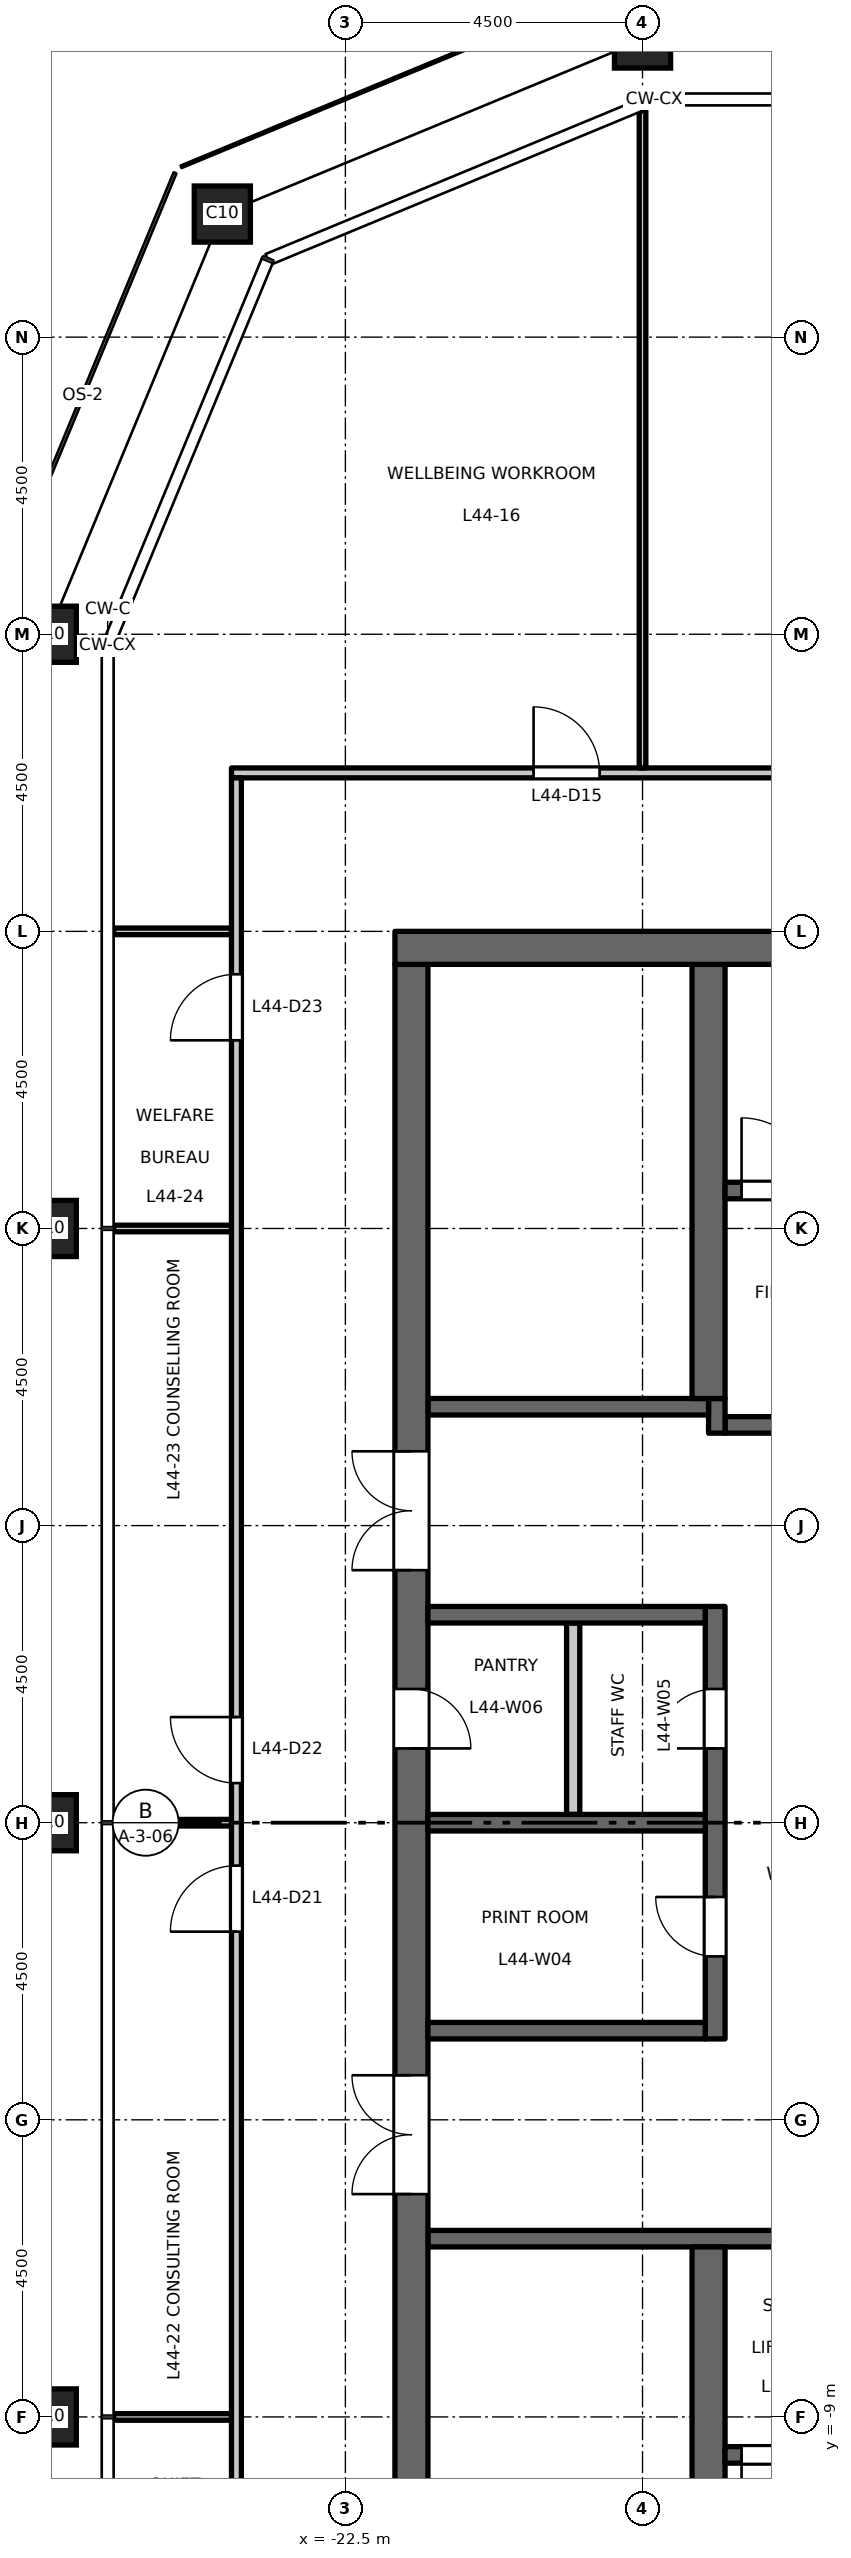
"""IFC4 building model, lengths in metres.
Left out: names, types, materials, properties, quantities, classifications, styles, units other than length and angle.
Written with IfcOpenShell. Run it as: python <this file> out.ifc"""

import sys

from ifc_helpers import new_model, si_unit, direction, frame, frame_2d, origin, origin_2d, place, context, subcontext, project, spatial, rectangle, hollow_rectangle, extrude, element, fill, save


model = new_model("IFC4")
c1 = context("Model", 3, precision=1e-05, world=origin(), true_north=direction((0.0, 1.0)))
c2 = subcontext(c1, "Body", "Model", "MODEL_VIEW")
j1 = project(units=[si_unit("LENGTHUNIT", "METRE"), si_unit("PLANEANGLEUNIT", "RADIAN")], contexts=[c1])
p1 = place(None, origin())
s1 = spatial("IfcSite", under=j1, at=p1, CompositionType="ELEMENT")
p2 = place(p1, origin())
s2 = spatial("IfcBuilding", under=s1, at=p2, CompositionType="ELEMENT")
p3 = place(p2, frame((0.0, 0.0, 206.2)))
s3 = spatial("IfcBuildingStorey", under=s2, at=p3, CompositionType="ELEMENT", Elevation=206.2)
for number, where, z_axis, x_axis in (
    (1, (-18.0, 27.0, 0.0), (0.0, 0.0, 1.0), (1.0, 0.0, 0.0)),
    (2, (-24.364, 24.364, 0.0), (0.0, 0.0, 1.0), (1.0, 0.0, 0.0)),
    (3, (-27.0, 18.0, 0.0), (0.0, 0.0, 1.0), (1.0, 0.0, 0.0)),
    (4, (-27.0, 9.0, 0.0), (0.0, 0.0, 1.0), (1.0, 0.0, 0.0)),
    (5, (-27.0, 0.0, 0.0), (0.0, 0.0, 1.0), (1.0, 0.0, 0.0)),
    (6, (-27.0, -9.0, 0.0), (0.0, 0.0, 1.0), (1.0, 0.0, 0.0)),
):
    element("IfcColumn", number, at=place(p3, frame(where, z_axis=z_axis, x_axis=x_axis)), inside=s3, PredefinedType="COLUMN", context=c2, shape_type="SweptSolid", body=[
        extrude(hollow_rectangle(XDim=0.85, YDim=0.85, WallThickness=0.05, at=origin_2d()), origin(), (0.0, 0.0, 1.0), 4.5),
    ])
p4 = place(p3, frame((-12.15, 6.025, 0.0), z_axis=(0.0, 0.0, 1.0), x_axis=(-1.0, 0.0, 0.0)))
e7 = element("IfcWall", 7, at=p4, inside=s3, PredefinedType="SHEAR", context=c2, shape_type="SweptSolid", body=[
    extrude(rectangle(XDim=4.6, YDim=0.25, at=frame_2d((2.3, 0.0))), origin(), (0.0, 0.0, 1.0), 4.35),
])
p5 = place(p4, frame((1.8, 0.0, 0.0)))
e8 = element("IfcOpeningElement", 8, at=p5, cuts=e7, PredefinedType="OPENING", context=c2, shape_type="SweptSolid", body=[
    extrude(rectangle(XDim=1.0, YDim=2.1, at=frame_2d((0.5, 1.05))), frame((0.0, 0.135, 0.0), z_axis=(0.0, -1.0, 0.0), x_axis=(1.0, 0.0, 0.0)), (0.0, 0.0, 1.0), 0.27),
])
p6 = place(p3, frame((-16.875, 5.9, 0.0), z_axis=(0.0, 0.0, 1.0), x_axis=(0.0, 1.0, 0.0)))
e9 = element("IfcWall", 9, at=p6, inside=s3, PredefinedType="SHEAR", context=c2, shape_type="SweptSolid", body=[
    extrude(rectangle(XDim=0.525, YDim=0.25, at=frame_2d((0.263, 0.0))), origin(), (0.0, 0.0, 1.0), 4.35),
])
p7 = place(p3, frame((-17.0, 6.3, 0.0), z_axis=(0.0, 0.0, 1.0), x_axis=(-1.0, 0.0, 0.0)))
e10 = element("IfcWall", 10, at=p7, inside=s3, PredefinedType="SHEAR", context=c2, shape_type="SweptSolid", body=[
    extrude(rectangle(XDim=4.25, YDim=0.25, at=frame_2d((2.125, 0.0))), origin(), (0.0, 0.0, 1.0), 4.35),
])
p8 = place(p3, frame((-12.15, -6.3, 0.0), z_axis=(0.0, 0.0, 1.0), x_axis=(-1.0, 0.0, 0.0)))
e11 = element("IfcWall", 11, at=p8, inside=s3, PredefinedType="SHEAR", context=c2, shape_type="SweptSolid", body=[
    extrude(rectangle(XDim=9.1, YDim=0.25, at=frame_2d((4.55, 0.0))), origin(), (0.0, 0.0, 1.0), 4.35),
])
p9 = place(p8, frame((1.8, 0.0, 0.0)))
e12 = element("IfcOpeningElement", 12, at=p9, cuts=e11, PredefinedType="OPENING", context=c2, shape_type="SweptSolid", body=[
    extrude(rectangle(XDim=1.0, YDim=2.1, at=frame_2d((0.5, 1.05))), frame((0.0, 0.135, 0.0), z_axis=(0.0, -1.0, 0.0), x_axis=(1.0, 0.0, 0.0)), (0.0, 0.0, 1.0), 0.27),
])
p10 = place(p3, frame((-21.5, -13.0, 0.0), z_axis=(0.0, 0.0, 1.0), x_axis=(0.0, 1.0, 0.0)))
e13 = element("IfcWall", 13, at=p10, inside=s3, PredefinedType="SHEAR", context=c2, shape_type="SweptSolid", body=[
    extrude(rectangle(XDim=26.0, YDim=0.5, at=frame_2d((13.0, 0.0))), origin(), (0.0, 0.0, 1.0), 4.35),
])
p11 = place(p10, frame((16.825, 0.0, 0.0)))
e14 = element("IfcOpeningElement", 14, at=p11, cuts=e13, PredefinedType="OPENING", context=c2, shape_type="SweptSolid", body=[
    extrude(rectangle(XDim=1.8, YDim=2.1, at=frame_2d((0.9, 1.05))), frame((0.0, 0.26, 0.0), z_axis=(0.0, -1.0, 0.0), x_axis=(1.0, 0.0, 0.0)), (0.0, 0.0, 1.0), 0.52),
])
p12 = place(p10, frame((7.375, 0.0, 0.0)))
e15 = element("IfcOpeningElement", 15, at=p12, cuts=e13, PredefinedType="OPENING", context=c2, shape_type="SweptSolid", body=[
    extrude(rectangle(XDim=1.8, YDim=2.1, at=frame_2d((0.9, 1.05))), frame((0.0, 0.26, 0.0), z_axis=(0.0, -1.0, 0.0), x_axis=(1.0, 0.0, 0.0)), (0.0, 0.0, 1.0), 0.52),
])
p13 = place(p10, frame((14.125, 0.0, 0.0)))
e16 = element("IfcOpeningElement", 16, at=p13, cuts=e13, PredefinedType="OPENING", context=c2, shape_type="SweptSolid", body=[
    extrude(rectangle(XDim=0.9, YDim=2.1, at=frame_2d((0.45, 1.05))), frame((0.0, 0.26, 0.0), z_axis=(0.0, -1.0, 0.0), x_axis=(1.0, 0.0, 0.0)), (0.0, 0.0, 1.0), 0.52),
])
p14 = place(p3, frame((-16.9, -3.275, 0.0), z_axis=(0.0, 0.0, 1.0), x_axis=(0.0, 1.0, 0.0)))
e17 = element("IfcWall", 17, at=p14, inside=s3, PredefinedType="SHEAR", context=c2, shape_type="SweptSolid", body=[
    extrude(rectangle(XDim=6.55, YDim=0.3, at=frame_2d((3.275, 0.0))), origin(), (0.0, 0.0, 1.0), 4.35),
])
p15 = place(p14, frame((1.25, 0.0, 0.0)))
e18 = element("IfcOpeningElement", 18, at=p15, cuts=e17, PredefinedType="OPENING", context=c2, shape_type="SweptSolid", body=[
    extrude(rectangle(XDim=0.9, YDim=2.1, at=frame_2d((0.45, 1.05))), frame((0.0, 0.16, 0.0), z_axis=(0.0, -1.0, 0.0), x_axis=(1.0, 0.0, 0.0)), (0.0, 0.0, 1.0), 0.32),
])
p16 = place(p14, frame((4.4, 0.0, 0.0)))
e19 = element("IfcOpeningElement", 19, at=p16, cuts=e17, PredefinedType="OPENING", context=c2, shape_type="SweptSolid", body=[
    extrude(rectangle(XDim=0.9, YDim=2.1, at=frame_2d((0.45, 1.05))), frame((0.0, 0.16, 0.0), z_axis=(0.0, -1.0, 0.0), x_axis=(1.0, 0.0, 0.0)), (0.0, 0.0, 1.0), 0.32),
])
for number, where, z_axis, x_axis in (
    (20, (-17.05, 0.0, 0.0), (0.0, 0.0, 1.0), (-1.0, 0.0, 0.0)),
    (21, (-17.05, 3.15, 0.0), (0.0, 0.0, 1.0), (-1.0, 0.0, 0.0)),
    (22, (-17.05, -3.15, 0.0), (0.0, 0.0, 1.0), (-1.0, 0.0, 0.0)),
):
    element("IfcWall", number, at=place(p3, frame(where, z_axis=z_axis, x_axis=x_axis)), inside=s3, PredefinedType="SHEAR", context=c2, shape_type="SweptSolid", body=[
        extrude(rectangle(XDim=4.2, YDim=0.25, at=frame_2d((2.1, 0.0))), origin(), (0.0, 0.0, 1.0), 4.35),
    ])
p17 = place(p3, frame((-19.05, 0.125, 0.0), z_axis=(0.0, 0.0, 1.0), x_axis=(0.0, 1.0, 0.0)))
e23 = element("IfcWall", 23, at=p17, inside=s3, PredefinedType="PARTITIONING", context=c2, shape_type="SweptSolid", body=[
    extrude(rectangle(XDim=2.9, YDim=0.2, at=frame_2d((1.45, 0.0))), origin(), (0.0, 0.0, 1.0), 4.35),
])
for number, where, z_axis, x_axis in (
    (24, (-17.0, 6.425, 0.0), (0.0, 0.0, 1.0), (0.0, 1.0, 0.0)),
    (25, (-17.0, -13.0, 0.0), (0.0, 0.0, 1.0), (0.0, 1.0, 0.0)),
):
    element("IfcWall", number, at=place(p3, frame(where, z_axis=z_axis, x_axis=x_axis)), inside=s3, PredefinedType="SHEAR", context=c2, shape_type="SweptSolid", body=[
        extrude(rectangle(XDim=6.575, YDim=0.5, at=frame_2d((3.288, 0.0))), origin(), (0.0, 0.0, 1.0), 4.35),
    ])
p18 = place(p3, frame((-8.75, 9.575, 0.0), z_axis=(0.0, 0.0, 1.0), x_axis=(-1.0, 0.0, 0.0)))
e26 = element("IfcWall", 26, at=p18, inside=s3, PredefinedType="SHEAR", context=c2, shape_type="SweptSolid", body=[
    extrude(rectangle(XDim=8.0, YDim=0.25, at=frame_2d((4.0, 0.0))), origin(), (0.0, 0.0, 1.0), 4.35),
])
p19 = place(p18, frame((6.65, 0.0, 0.0)))
e27 = element("IfcOpeningElement", 27, at=p19, cuts=e26, PredefinedType="OPENING", context=c2, shape_type="SweptSolid", body=[
    extrude(rectangle(XDim=1.1, YDim=2.1, at=frame_2d((0.55, 1.05))), frame((0.0, 0.135, 0.0), z_axis=(0.0, -1.0, 0.0), x_axis=(1.0, 0.0, 0.0)), (0.0, 0.0, 1.0), 0.27),
])
p20 = place(p3, frame((-8.75, -9.575, 0.0), z_axis=(0.0, 0.0, 1.0), x_axis=(-1.0, 0.0, 0.0)))
e28 = element("IfcWall", 28, at=p20, inside=s3, PredefinedType="SHEAR", context=c2, shape_type="SweptSolid", body=[
    extrude(rectangle(XDim=8.0, YDim=0.25, at=frame_2d((4.0, 0.0))), origin(), (0.0, 0.0, 1.0), 4.35),
])
p21 = place(p20, frame((6.65, 0.0, 0.0)))
e29 = element("IfcOpeningElement", 29, at=p21, cuts=e28, PredefinedType="OPENING", context=c2, shape_type="SweptSolid", body=[
    extrude(rectangle(XDim=1.1, YDim=2.1, at=frame_2d((0.55, 1.05))), frame((0.0, 0.135, 0.0), z_axis=(0.0, -1.0, 0.0), x_axis=(1.0, 0.0, 0.0)), (0.0, 0.0, 1.0), 0.27),
])
p22 = place(p3, frame((-8.25, 13.25, 0.0), z_axis=(0.0, 0.0, 1.0), x_axis=(-1.0, 0.0, 0.0)))
e30 = element("IfcWall", 30, at=p22, inside=s3, PredefinedType="SHEAR", context=c2, shape_type="SweptSolid", body=[
    extrude(rectangle(XDim=13.5, YDim=0.5, at=frame_2d((6.75, 0.0))), origin(), (0.0, 0.0, 1.0), 4.35),
])
for number, where, z_axis, x_axis in (
    (31, (-26.01, -9.0, 0.0), (0.0, 0.0, 1.0), (1.0, 0.0, 0.0)),
    (32, (-26.01, 0.0, 0.0), (0.0, 0.0, 1.0), (1.0, 0.0, 0.0)),
    (33, (-26.01, 9.0, 0.0), (0.0, 0.0, 1.0), (1.0, 0.0, 0.0)),
    (34, (-26.01, 13.5, 0.0), (0.0, 0.0, 1.0), (1.0, 0.0, 0.0)),
):
    element("IfcWall", number, at=place(p3, frame(where, z_axis=z_axis, x_axis=x_axis)), inside=s3, PredefinedType="PARTITIONING", context=c2, shape_type="SweptSolid", body=[
        extrude(rectangle(XDim=1.785, YDim=0.1, at=frame_2d((0.893, 0.0))), origin(), (0.0, 0.0, 1.0), 4.35),
    ])
p23 = place(p3, frame((-24.225, 15.9, 0.0), z_axis=(0.0, 0.0, 1.0), x_axis=(1.0, 0.0, 0.0)))
e35 = element("IfcWall", 35, at=p23, inside=s3, PredefinedType="PARTITIONING", context=c2, shape_type="SweptSolid", body=[
    extrude(rectangle(XDim=48.45, YDim=0.15, at=frame_2d((24.225, 0.0))), origin(), (0.0, 0.0, 1.0), 4.35),
])
p24 = place(p23, frame((13.575, 0.0, 0.0)))
e36 = element("IfcOpeningElement", 36, at=p24, cuts=e35, PredefinedType="OPENING", context=c2, shape_type="SweptSolid", body=[
    extrude(rectangle(XDim=1.0, YDim=2.1, at=frame_2d((0.5, 1.05))), frame((0.0, 0.085, 0.0), z_axis=(0.0, -1.0, 0.0), x_axis=(1.0, 0.0, 0.0)), (0.0, 0.0, 1.0), 0.17),
])
p25 = place(p23, frame((15.825, 0.0, 0.0)))
e37 = element("IfcOpeningElement", 37, at=p25, cuts=e35, PredefinedType="OPENING", context=c2, shape_type="SweptSolid", body=[
    extrude(rectangle(XDim=1.0, YDim=2.1, at=frame_2d((0.5, 1.05))), frame((0.0, 0.085, 0.0), z_axis=(0.0, -1.0, 0.0), x_axis=(1.0, 0.0, 0.0)), (0.0, 0.0, 1.0), 0.17),
])
p26 = place(p23, frame((31.575, 0.0, 0.0)))
e38 = element("IfcOpeningElement", 38, at=p26, cuts=e35, PredefinedType="OPENING", context=c2, shape_type="SweptSolid", body=[
    extrude(rectangle(XDim=1.0, YDim=2.1, at=frame_2d((0.5, 1.05))), frame((0.0, 0.085, 0.0), z_axis=(0.0, -1.0, 0.0), x_axis=(1.0, 0.0, 0.0)), (0.0, 0.0, 1.0), 0.17),
])
p27 = place(p23, frame((40.575, 0.0, 0.0)))
e39 = element("IfcOpeningElement", 39, at=p27, cuts=e35, PredefinedType="OPENING", context=c2, shape_type="SweptSolid", body=[
    extrude(rectangle(XDim=1.0, YDim=2.1, at=frame_2d((0.5, 1.05))), frame((0.0, 0.085, 0.0), z_axis=(0.0, -1.0, 0.0), x_axis=(1.0, 0.0, 0.0)), (0.0, 0.0, 1.0), 0.17),
])
p28 = place(p23, frame((4.575, 0.0, 0.0)))
e40 = element("IfcOpeningElement", 40, at=p28, cuts=e35, PredefinedType="OPENING", context=c2, shape_type="SweptSolid", body=[
    extrude(rectangle(XDim=1.0, YDim=2.1, at=frame_2d((0.5, 1.05))), frame((0.0, 0.085, 0.0), z_axis=(0.0, -1.0, 0.0), x_axis=(1.0, 0.0, 0.0)), (0.0, 0.0, 1.0), 0.17),
])
p29 = place(p23, frame((42.725, 0.0, 0.0)))
e41 = element("IfcOpeningElement", 41, at=p29, cuts=e35, PredefinedType="OPENING", context=c2, shape_type="SweptSolid", body=[
    extrude(rectangle(XDim=1.0, YDim=2.1, at=frame_2d((0.5, 1.05))), frame((0.0, 0.085, 0.0), z_axis=(0.0, -1.0, 0.0), x_axis=(1.0, 0.0, 0.0)), (0.0, 0.0, 1.0), 0.17),
])
p30 = place(p3, frame((-24.15, -15.825, 0.0), z_axis=(0.0, 0.0, 1.0), x_axis=(0.0, 1.0, 0.0)))
e42 = element("IfcWall", 42, at=p30, inside=s3, PredefinedType="PARTITIONING", context=c2, shape_type="SweptSolid", body=[
    extrude(rectangle(XDim=31.65, YDim=0.15, at=frame_2d((15.825, 0.0))), origin(), (0.0, 0.0, 1.0), 4.35),
])
p31 = place(p30, frame((0.675, 0.0, 0.0)))
e43 = element("IfcOpeningElement", 43, at=p31, cuts=e42, PredefinedType="OPENING", context=c2, shape_type="SweptSolid", body=[
    extrude(rectangle(XDim=1.0, YDim=2.1, at=frame_2d((0.5, 1.05))), frame((0.0, 0.085, 0.0), z_axis=(0.0, -1.0, 0.0), x_axis=(1.0, 0.0, 0.0)), (0.0, 0.0, 1.0), 0.17),
])
p32 = place(p30, frame((2.925, 0.0, 0.0)))
e44 = element("IfcOpeningElement", 44, at=p32, cuts=e42, PredefinedType="OPENING", context=c2, shape_type="SweptSolid", body=[
    extrude(rectangle(XDim=1.0, YDim=2.1, at=frame_2d((0.5, 1.05))), frame((0.0, 0.085, 0.0), z_axis=(0.0, -1.0, 0.0), x_axis=(1.0, 0.0, 0.0)), (0.0, 0.0, 1.0), 0.17),
])
p33 = place(p30, frame((14.175, 0.0, 0.0)))
e45 = element("IfcOpeningElement", 45, at=p33, cuts=e42, PredefinedType="OPENING", context=c2, shape_type="SweptSolid", body=[
    extrude(rectangle(XDim=1.0, YDim=2.1, at=frame_2d((0.5, 1.05))), frame((0.0, 0.085, 0.0), z_axis=(0.0, -1.0, 0.0), x_axis=(1.0, 0.0, 0.0)), (0.0, 0.0, 1.0), 0.17),
])
p34 = place(p30, frame((16.425, 0.0, 0.0)))
e46 = element("IfcOpeningElement", 46, at=p34, cuts=e42, PredefinedType="OPENING", context=c2, shape_type="SweptSolid", body=[
    extrude(rectangle(XDim=1.0, YDim=2.1, at=frame_2d((0.5, 1.05))), frame((0.0, 0.085, 0.0), z_axis=(0.0, -1.0, 0.0), x_axis=(1.0, 0.0, 0.0)), (0.0, 0.0, 1.0), 0.17),
])
p35 = place(p30, frame((27.675, 0.0, 0.0)))
e47 = element("IfcOpeningElement", 47, at=p35, cuts=e42, PredefinedType="OPENING", context=c2, shape_type="SweptSolid", body=[
    extrude(rectangle(XDim=1.0, YDim=2.1, at=frame_2d((0.5, 1.05))), frame((0.0, 0.085, 0.0), z_axis=(0.0, -1.0, 0.0), x_axis=(1.0, 0.0, 0.0)), (0.0, 0.0, 1.0), 0.17),
])
p36 = place(p3, frame((-18.0, 15.975, 0.0), z_axis=(0.0, 0.0, 1.0), x_axis=(0.0, 1.0, 0.0)))
e48 = element("IfcWall", 48, at=p36, inside=s3, PredefinedType="PARTITIONING", context=c2, shape_type="SweptSolid", body=[
    extrude(rectangle(XDim=9.953, YDim=0.1, at=frame_2d((4.977, 0.0))), origin(), (0.0, 0.0, 1.0), 3.65),
])
p37 = place(p19, origin())
e49 = element("IfcDoor", 49, at=p37, inside=s3, OperationType="SINGLE_SWING_RIGHT", PredefinedType="DOOR", context=c2, shape_type="SweptSolid", body=[
    extrude(rectangle(XDim=1.1, YDim=2.1, at=frame_2d((0.55, 1.05))), frame((0.0, 0.025, 0.0), z_axis=(0.0, -1.0, 0.0), x_axis=(1.0, 0.0, 0.0)), (0.0, 0.0, 1.0), 0.05),
])
fill(e27, e49)
p38 = place(p21, origin())
e50 = element("IfcDoor", 50, at=p38, inside=s3, OperationType="SINGLE_SWING_LEFT", PredefinedType="DOOR", context=c2, shape_type="SweptSolid", body=[
    extrude(rectangle(XDim=1.1, YDim=2.1, at=frame_2d((0.55, 1.05))), frame((0.0, 0.025, 0.0), z_axis=(0.0, -1.0, 0.0), x_axis=(1.0, 0.0, 0.0)), (0.0, 0.0, 1.0), 0.05),
])
fill(e29, e50)
p39 = place(p11, origin())
e51 = element("IfcDoor", 51, at=p39, inside=s3, OperationType="DOUBLE_DOOR_DOUBLE_SWING", PredefinedType="DOOR", context=c2, shape_type="SweptSolid", body=[
    extrude(rectangle(XDim=1.8, YDim=2.1, at=frame_2d((0.9, 1.05))), frame((0.0, 0.025, 0.0), z_axis=(0.0, -1.0, 0.0), x_axis=(1.0, 0.0, 0.0)), (0.0, 0.0, 1.0), 0.05),
])
fill(e14, e51)
p40 = place(p12, origin())
e52 = element("IfcDoor", 52, at=p40, inside=s3, OperationType="DOUBLE_DOOR_DOUBLE_SWING", PredefinedType="DOOR", context=c2, shape_type="SweptSolid", body=[
    extrude(rectangle(XDim=1.8, YDim=2.1, at=frame_2d((0.9, 1.05))), frame((0.0, 0.025, 0.0), z_axis=(0.0, -1.0, 0.0), x_axis=(1.0, 0.0, 0.0)), (0.0, 0.0, 1.0), 0.05),
])
fill(e15, e52)
p41 = place(p15, origin())
e53 = element("IfcDoor", 53, at=p41, inside=s3, OperationType="SINGLE_SWING_LEFT", PredefinedType="DOOR", context=c2, shape_type="SweptSolid", body=[
    extrude(rectangle(XDim=0.9, YDim=2.1, at=frame_2d((0.45, 1.05))), frame((0.0, 0.025, 0.0), z_axis=(0.0, -1.0, 0.0), x_axis=(1.0, 0.0, 0.0)), (0.0, 0.0, 1.0), 0.05),
])
fill(e18, e53)
p42 = place(p16, origin())
e54 = element("IfcDoor", 54, at=p42, inside=s3, OperationType="SINGLE_SWING_RIGHT", PredefinedType="DOOR", context=c2, shape_type="SweptSolid", body=[
    extrude(rectangle(XDim=0.9, YDim=2.1, at=frame_2d((0.45, 1.05))), frame((0.0, 0.025, 0.0), z_axis=(0.0, -1.0, 0.0), x_axis=(1.0, 0.0, 0.0)), (0.0, 0.0, 1.0), 0.05),
])
fill(e19, e54)
p43 = place(p13, origin())
e55 = element("IfcDoor", 55, at=p43, inside=s3, OperationType="SINGLE_SWING_LEFT", PredefinedType="DOOR", context=c2, shape_type="SweptSolid", body=[
    extrude(rectangle(XDim=0.9, YDim=2.1, at=frame_2d((0.45, 1.05))), frame((0.0, 0.025, 0.0), z_axis=(0.0, -1.0, 0.0), x_axis=(1.0, 0.0, 0.0)), (0.0, 0.0, 1.0), 0.05),
])
fill(e16, e55)
p44 = place(p28, origin())
e56 = element("IfcDoor", 56, at=p44, inside=s3, OperationType="SINGLE_SWING_LEFT", PredefinedType="DOOR", context=c2, shape_type="SweptSolid", body=[
    extrude(rectangle(XDim=1.0, YDim=2.1, at=frame_2d((0.5, 1.05))), frame((0.0, 0.025, 0.0), z_axis=(0.0, -1.0, 0.0), x_axis=(1.0, 0.0, 0.0)), (0.0, 0.0, 1.0), 0.05),
])
fill(e40, e56)
p45 = place(p33, origin())
e57 = element("IfcDoor", 57, at=p45, inside=s3, OperationType="SINGLE_SWING_LEFT", PredefinedType="DOOR", context=c2, shape_type="SweptSolid", body=[
    extrude(rectangle(XDim=1.0, YDim=2.1, at=frame_2d((0.5, 1.05))), frame((0.0, 0.025, 0.0), z_axis=(0.0, -1.0, 0.0), x_axis=(1.0, 0.0, 0.0)), (0.0, 0.0, 1.0), 0.05),
])
fill(e45, e57)
p46 = place(p34, origin())
e58 = element("IfcDoor", 58, at=p46, inside=s3, OperationType="SINGLE_SWING_RIGHT", PredefinedType="DOOR", context=c2, shape_type="SweptSolid", body=[
    extrude(rectangle(XDim=1.0, YDim=2.1, at=frame_2d((0.5, 1.05))), frame((0.0, 0.025, 0.0), z_axis=(0.0, -1.0, 0.0), x_axis=(1.0, 0.0, 0.0)), (0.0, 0.0, 1.0), 0.05),
])
fill(e46, e58)
p47 = place(p35, origin())
e59 = element("IfcDoor", 59, at=p47, inside=s3, OperationType="SINGLE_SWING_LEFT", PredefinedType="DOOR", context=c2, shape_type="SweptSolid", body=[
    extrude(rectangle(XDim=1.0, YDim=2.1, at=frame_2d((0.5, 1.05))), frame((0.0, 0.025, 0.0), z_axis=(0.0, -1.0, 0.0), x_axis=(1.0, 0.0, 0.0)), (0.0, 0.0, 1.0), 0.05),
])
fill(e47, e59)
save(model, sys.argv[1])
